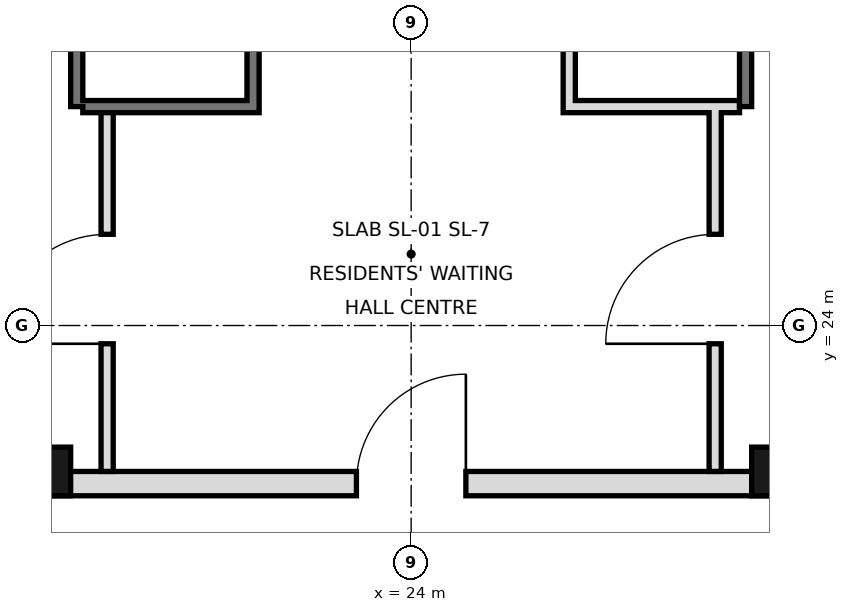
"""IFC4 building model, lengths in metres.
Left out: names, types, materials, properties, quantities, classifications, styles, units other than length and angle.
Written with IfcOpenShell. Run it as: python <this file> out.ifc"""

import sys

from ifc_helpers import new_model, si_unit, direction, frame, frame_2d, origin, origin_2d, place, context, subcontext, project, spatial, rectangle, hollow_rectangle, extrude, element, fill, save


model = new_model("IFC4")
c1 = context("Model", 3, precision=1e-05, world=origin(), true_north=direction((0.0, 1.0)))
c2 = subcontext(c1, "Body", "Model", "MODEL_VIEW")
j1 = project(units=[si_unit("LENGTHUNIT", "METRE"), si_unit("PLANEANGLEUNIT", "RADIAN")], contexts=[c1])
p1 = place(None, origin())
s1 = spatial("IfcSite", under=j1, at=p1, CompositionType="ELEMENT")
p2 = place(p1, origin())
s2 = spatial("IfcBuilding", under=s1, at=p2, CompositionType="ELEMENT")
p3 = place(p2, frame((0.0, 0.0, 199.2)))
s3 = spatial("IfcBuildingStorey", under=s2, at=p3, CompositionType="ELEMENT", Elevation=199.2)
for number, where, z_axis, x_axis in (
    (1, (18.0, 21.6, 0.0), (0.0, 0.0, 1.0), (1.0, 0.0, 0.0)),
    (2, (30.0, 21.6, 0.0), (0.0, 0.0, 1.0), (1.0, 0.0, 0.0)),
):
    element("IfcColumn", number, at=place(p3, frame(where, z_axis=z_axis, x_axis=x_axis)), inside=s3, PredefinedType="COLUMN", context=c2, shape_type="SweptSolid", body=[
        extrude(hollow_rectangle(XDim=0.8, YDim=0.8, WallThickness=0.04, at=origin_2d()), origin(), (0.0, 0.0, 1.0), 3.6),
    ])
for number, where, z_axis, x_axis in (
    (3, (18.5, 27.6, 0.0), (0.0, 0.0, 1.0), (0.0, 1.0, 0.0)),
    (4, (29.5, 27.6, 0.0), (0.0, 0.0, 1.0), (0.0, 1.0, 0.0)),
):
    element("IfcWall", number, at=place(p3, frame(where, z_axis=z_axis, x_axis=x_axis)), inside=s3, PredefinedType="SOLIDWALL", context=c2, shape_type="SweptSolid", body=[
        extrude(rectangle(XDim=17.5, YDim=0.2, at=frame_2d((8.75, 0.0))), origin(), (0.0, 0.0, 1.0), 3.42),
    ])
p4 = place(p3, frame((5.6, 21.4, 0.0), z_axis=(0.0, 0.0, 1.0), x_axis=(1.0, 0.0, 0.0)))
e5 = element("IfcWall", 5, at=p4, inside=s3, PredefinedType="SOLIDWALL", context=c2, shape_type="SweptSolid", body=[
    extrude(rectangle(XDim=36.8, YDim=0.4, at=frame_2d((18.4, 0.0))), origin(), (0.0, 0.0, 1.0), 3.42),
])
p5 = place(p4, frame((8.5, 0.0, 0.0)))
e6 = element("IfcOpeningElement", 6, at=p5, cuts=e5, PredefinedType="OPENING", context=c2, shape_type="SweptSolid", body=[
    extrude(rectangle(XDim=1.8, YDim=2.1, at=frame_2d((0.9, 1.05))), frame((0.0, 0.21, 0.0), z_axis=(0.0, -1.0, 0.0), x_axis=(1.0, 0.0, 0.0)), (0.0, 0.0, 1.0), 0.42),
])
p6 = place(p4, frame((17.5, 0.0, 0.0)))
e7 = element("IfcOpeningElement", 7, at=p6, cuts=e5, PredefinedType="OPENING", context=c2, shape_type="SweptSolid", body=[
    extrude(rectangle(XDim=1.8, YDim=2.1, at=frame_2d((0.9, 1.05))), frame((0.0, 0.21, 0.0), z_axis=(0.0, -1.0, 0.0), x_axis=(1.0, 0.0, 0.0)), (0.0, 0.0, 1.0), 0.42),
])
p7 = place(p4, frame((26.5, 0.0, 0.0)))
e8 = element("IfcOpeningElement", 8, at=p7, cuts=e5, PredefinedType="OPENING", context=c2, shape_type="SweptSolid", body=[
    extrude(rectangle(XDim=1.8, YDim=2.1, at=frame_2d((0.9, 1.05))), frame((0.0, 0.21, 0.0), z_axis=(0.0, -1.0, 0.0), x_axis=(1.0, 0.0, 0.0)), (0.0, 0.0, 1.0), 0.42),
])
p8 = place(p4, frame((4.5, 0.0, 0.0)))
e9 = element("IfcOpeningElement", 9, at=p8, cuts=e5, PredefinedType="OPENING", context=c2, shape_type="SweptSolid", body=[
    extrude(rectangle(XDim=1.2, YDim=2.1, at=frame_2d((0.6, 1.05))), frame((0.0, 0.21, 0.0), z_axis=(0.0, -1.0, 0.0), x_axis=(1.0, 0.0, 0.0)), (0.0, 0.0, 1.0), 0.42),
])
p9 = place(p4, frame((31.1, 0.0, 0.0)))
e10 = element("IfcOpeningElement", 10, at=p9, cuts=e5, PredefinedType="OPENING", context=c2, shape_type="SweptSolid", body=[
    extrude(rectangle(XDim=1.2, YDim=2.1, at=frame_2d((0.6, 1.05))), frame((0.0, 0.21, 0.0), z_axis=(0.0, -1.0, 0.0), x_axis=(1.0, 0.0, 0.0)), (0.0, 0.0, 1.0), 0.42),
])
p10 = place(p3, frame((19.0, 21.6, 0.0), z_axis=(0.0, 0.0, 1.0), x_axis=(0.0, 1.0, 0.0)))
e11 = element("IfcWall", 11, at=p10, inside=s3, PredefinedType="PARTITIONING", context=c2, shape_type="SweptSolid", body=[
    extrude(rectangle(XDim=6.0, YDim=0.2, at=frame_2d((3.0, 0.0))), origin(), (0.0, 0.0, 1.0), 3.42),
])
p11 = place(p10, frame((2.1, 0.0, 0.0)))
e12 = element("IfcOpeningElement", 12, at=p11, cuts=e11, PredefinedType="OPENING", context=c2, shape_type="SweptSolid", body=[
    extrude(rectangle(XDim=1.8, YDim=2.1, at=frame_2d((0.9, 1.05))), frame((0.0, 0.11, 0.0), z_axis=(0.0, -1.0, 0.0), x_axis=(1.0, 0.0, 0.0)), (0.0, 0.0, 1.0), 0.22),
])
p12 = place(p3, frame((29.0, 21.6, 0.0), z_axis=(0.0, 0.0, 1.0), x_axis=(0.0, 1.0, 0.0)))
e13 = element("IfcWall", 13, at=p12, inside=s3, PredefinedType="PARTITIONING", context=c2, shape_type="SweptSolid", body=[
    extrude(rectangle(XDim=6.0, YDim=0.2, at=frame_2d((3.0, 0.0))), origin(), (0.0, 0.0, 1.0), 3.42),
])
p13 = place(p12, frame((2.1, 0.0, 0.0)))
e14 = element("IfcOpeningElement", 14, at=p13, cuts=e13, PredefinedType="OPENING", context=c2, shape_type="SweptSolid", body=[
    extrude(rectangle(XDim=1.8, YDim=2.1, at=frame_2d((0.9, 1.05))), frame((0.0, 0.11, 0.0), z_axis=(0.0, -1.0, 0.0), x_axis=(1.0, 0.0, 0.0)), (0.0, 0.0, 1.0), 0.22),
])
p14 = place(p3, frame((21.4, 27.5, 0.0), z_axis=(0.0, 0.0, 1.0), x_axis=(0.0, 1.0, 0.0)))
e15 = element("IfcWall", 15, at=p14, inside=s3, PredefinedType="SOLIDWALL", context=c2, shape_type="SweptSolid", body=[
    extrude(rectangle(XDim=17.5, YDim=0.2, at=frame_2d((8.75, 0.0))), origin(), (0.0, 0.0, 1.0), 3.42),
])
p15 = place(p14, frame((16.2, 0.0, 0.0)))
e16 = element("IfcOpeningElement", 16, at=p15, cuts=e15, PredefinedType="OPENING", context=c2, shape_type="SweptSolid", body=[
    extrude(rectangle(XDim=1.0, YDim=2.1, at=frame_2d((0.5, 1.05))), frame((0.0, 0.11, 0.0), z_axis=(0.0, -1.0, 0.0), x_axis=(1.0, 0.0, 0.0)), (0.0, 0.0, 1.0), 0.22),
])
p16 = place(p14, frame((7.4, 0.0, 0.0)))
e17 = element("IfcOpeningElement", 17, at=p16, cuts=e15, PredefinedType="OPENING", context=c2, shape_type="SweptSolid", body=[
    extrude(rectangle(XDim=0.9, YDim=2.1, at=frame_2d((0.45, 1.05))), frame((0.0, 0.11, 0.0), z_axis=(0.0, -1.0, 0.0), x_axis=(1.0, 0.0, 0.0)), (0.0, 0.0, 1.0), 0.22),
])
p17 = place(p3, frame((26.6, 27.5, 0.0), z_axis=(0.0, 0.0, 1.0), x_axis=(0.0, 1.0, 0.0)))
e18 = element("IfcWall", 18, at=p17, inside=s3, PredefinedType="SOLIDWALL", context=c2, shape_type="SweptSolid", body=[
    extrude(rectangle(XDim=17.5, YDim=0.2, at=frame_2d((8.75, 0.0))), origin(), (0.0, 0.0, 1.0), 3.42),
])
p18 = place(p17, frame((4.3, 0.0, 0.0)))
e19 = element("IfcOpeningElement", 19, at=p18, cuts=e18, PredefinedType="OPENING", context=c2, shape_type="SweptSolid", body=[
    extrude(rectangle(XDim=0.9, YDim=2.1, at=frame_2d((0.45, 1.05))), frame((0.0, 0.11, 0.0), z_axis=(0.0, -1.0, 0.0), x_axis=(1.0, 0.0, 0.0)), (0.0, 0.0, 1.0), 0.22),
])
p19 = place(p17, frame((10.35, 0.0, 0.0)))
e20 = element("IfcOpeningElement", 20, at=p19, cuts=e18, PredefinedType="OPENING", context=c2, shape_type="SweptSolid", body=[
    extrude(rectangle(XDim=1.0, YDim=2.1, at=frame_2d((0.5, 1.05))), frame((0.0, 0.11, 0.0), z_axis=(0.0, -1.0, 0.0), x_axis=(1.0, 0.0, 0.0)), (0.0, 0.0, 1.0), 0.22),
])
p20 = place(p17, frame((15.475, 0.0, 0.0)))
e21 = element("IfcOpeningElement", 21, at=p20, cuts=e18, PredefinedType="OPENING", context=c2, shape_type="SweptSolid", body=[
    extrude(rectangle(XDim=1.0, YDim=2.1, at=frame_2d((0.5, 1.05))), frame((0.0, 0.11, 0.0), z_axis=(0.0, -1.0, 0.0), x_axis=(1.0, 0.0, 0.0)), (0.0, 0.0, 1.0), 0.22),
])
for number, where, z_axis, x_axis in (
    (22, (18.6, 27.6, 0.0), (0.0, 0.0, 1.0), (1.0, 0.0, 0.0)),
    (23, (26.7, 27.6, 0.0), (0.0, 0.0, 1.0), (1.0, 0.0, 0.0)),
):
    element("IfcWall", number, at=place(p3, frame(where, z_axis=z_axis, x_axis=x_axis)), inside=s3, PredefinedType="SOLIDWALL", context=c2, shape_type="SweptSolid", body=[
        extrude(rectangle(XDim=2.7, YDim=0.2, at=frame_2d((1.35, 0.0))), origin(), (0.0, 0.0, 1.0), 3.42),
    ])
p21 = place(p11, origin())
e24 = element("IfcDoor", 24, at=p21, inside=s3, OperationType="SINGLE_SWING_LEFT", PredefinedType="DOOR", context=c2, shape_type="SweptSolid", body=[
    extrude(rectangle(XDim=1.8, YDim=2.1, at=frame_2d((0.9, 1.05))), frame((0.0, 0.025, 0.0), z_axis=(0.0, -1.0, 0.0), x_axis=(1.0, 0.0, 0.0)), (0.0, 0.0, 1.0), 0.05),
])
fill(e12, e24)
p22 = place(p6, frame((1.8, 0.0, 0.0), z_axis=(0.0, 0.0, 1.0), x_axis=(-1.0, 0.0, 0.0)))
e25 = element("IfcDoor", 25, at=p22, inside=s3, OperationType="SINGLE_SWING_LEFT", PredefinedType="DOOR", context=c2, shape_type="SweptSolid", body=[
    extrude(rectangle(XDim=1.8, YDim=2.1, at=frame_2d((0.9, 1.05))), frame((0.0, 0.025, 0.0), z_axis=(0.0, -1.0, 0.0), x_axis=(1.0, 0.0, 0.0)), (0.0, 0.0, 1.0), 0.05),
])
fill(e7, e25)
p23 = place(p13, origin())
e26 = element("IfcDoor", 26, at=p23, inside=s3, OperationType="SINGLE_SWING_LEFT", PredefinedType="DOOR", context=c2, shape_type="SweptSolid", body=[
    extrude(rectangle(XDim=1.8, YDim=2.1, at=frame_2d((0.9, 1.05))), frame((0.0, 0.025, 0.0), z_axis=(0.0, -1.0, 0.0), x_axis=(1.0, 0.0, 0.0)), (0.0, 0.0, 1.0), 0.05),
])
fill(e14, e26)
save(model, sys.argv[1])
